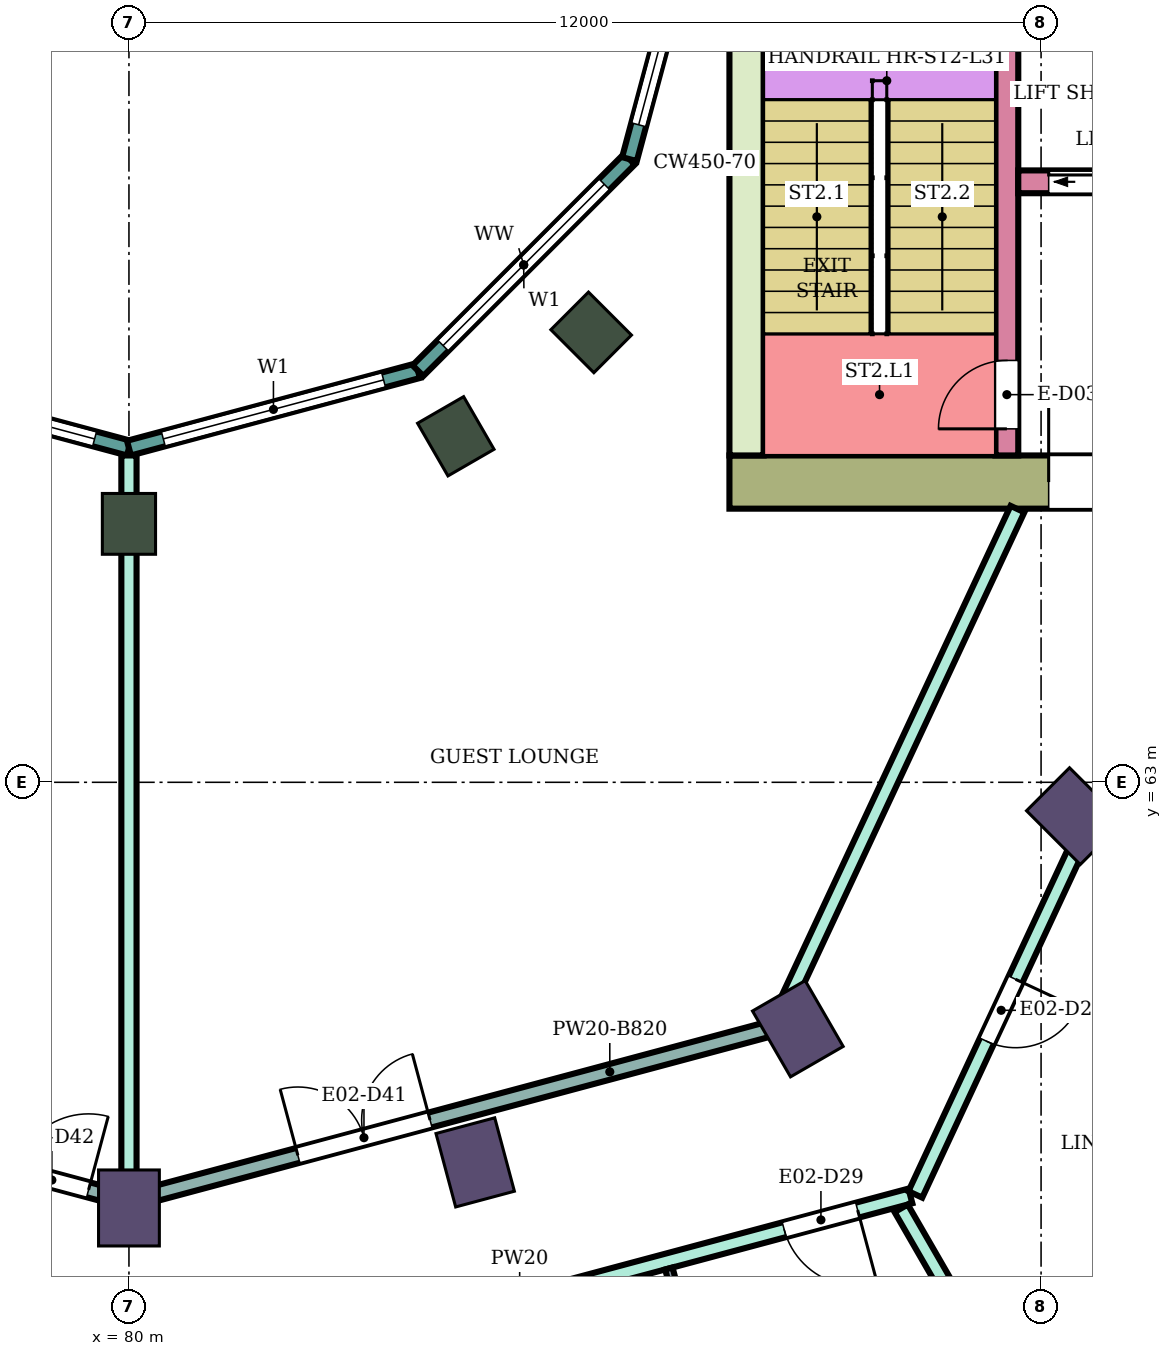
"""IFC4 building model, lengths in metres.
Left out: names, types, materials, properties, quantities, classifications, styles, units other than length and angle.
Written with IfcOpenShell. Run it as: python <this file> out.ifc"""

import sys

from ifc_helpers import new_model, si_unit, direction, frame, frame_2d, origin, origin_2d, place, context, subcontext, project, spatial, rectangle, extrude, element, fill, save


model = new_model("IFC4")
c1 = context("Model", 3, precision=1e-05, world=origin(), true_north=direction((0.0, 1.0)))
c2 = subcontext(c1, "Body", "Model", "MODEL_VIEW")
j1 = project(units=[si_unit("LENGTHUNIT", "METRE"), si_unit("PLANEANGLEUNIT", "RADIAN")], contexts=[c1])
p1 = place(None, origin())
s1 = spatial("IfcSite", under=j1, at=p1, CompositionType="ELEMENT")
p2 = place(p1, origin())
s2 = spatial("IfcBuilding", under=s1, at=p2, CompositionType="ELEMENT")
p3 = place(p2, frame((0.0, 0.0, 134.1)))
s3 = spatial("IfcBuildingStorey", under=s2, at=p3, CompositionType="ELEMENT", Elevation=134.1)
for number, where, z_axis, x_axis in (
    (1, (80.0, 57.4, 0.0), (0.0, 0.0, 1.0), (0.0, -1.0, 0.0)),
    (2, (84.555, 58.0, 0.0), (0.0, 0.0, 1.0), (0.259, -0.966, 0.0)),
    (3, (88.8, 59.758, 0.0), (0.0, 0.0, 1.0), (0.5, -0.866, 0.0)),
    (4, (92.445, 62.555, 0.0), (0.0, 0.0, 1.0), (0.707, -0.707, 0.0)),
):
    element("IfcColumn", number, at=place(p3, frame(where, z_axis=z_axis, x_axis=x_axis)), inside=s3, PredefinedType="COLUMN", context=c2, shape_type="SweptSolid", body=[
        extrude(rectangle(XDim=1.0, YDim=0.8, at=origin_2d()), origin(), (0.0, 0.0, 1.0), 3.9),
    ])
for number, where, z_axis, x_axis in (
    (5, (80.0, 66.4, 0.0), (0.0, 0.0, 1.0), (0.0, -1.0, 0.0)),
    (6, (84.3, 67.552, 0.0), (0.0, 0.0, 1.0), (0.5, -0.866, 0.0)),
    (7, (86.081, 68.919, 0.0), (0.0, 0.0, 1.0), (0.707, -0.707, 0.0)),
):
    element("IfcColumn", number, at=place(p3, frame(where, z_axis=z_axis, x_axis=x_axis)), inside=s3, PredefinedType="COLUMN", context=c2, shape_type="SweptSolid", body=[
        extrude(rectangle(XDim=0.8, YDim=0.7, at=origin_2d()), origin(), (0.0, 0.0, 1.0), 3.9),
    ])
p4 = place(p3, frame((87.9, 66.95, 0.0), z_axis=(0.0, 0.0, 1.0), x_axis=(1.0, 0.0, 0.0)))
e8 = element("IfcWall", 8, at=p4, inside=s3, PredefinedType="SHEAR", context=c2, shape_type="SweptSolid", body=[
    extrude(rectangle(XDim=14.8, YDim=0.7, at=frame_2d((7.4, 0.0))), origin(), (0.0, 0.0, 1.0), 3.58),
])
p5 = place(p4, frame((4.2, 0.0, 0.0)))
e9 = element("IfcOpeningElement", 9, at=p5, cuts=e8, PredefinedType="OPENING", context=c2, shape_type="SweptSolid", body=[
    extrude(rectangle(XDim=2.4, YDim=2.4, at=frame_2d((1.2, 1.2))), frame((0.0, 0.36, 0.0), z_axis=(0.0, -1.0, 0.0), x_axis=(1.0, 0.0, 0.0)), (0.0, 0.0, 1.0), 0.72),
])
p6 = place(p3, frame((88.125, 67.3, 0.0), z_axis=(0.0, 0.0, 1.0), x_axis=(0.0, 1.0, 0.0)))
e10 = element("IfcWall", 10, at=p6, inside=s3, PredefinedType="SHEAR", context=c2, shape_type="SweptSolid", body=[
    extrude(rectangle(XDim=7.7, YDim=0.45, at=frame_2d((3.85, 0.0))), origin(), (0.0, 0.0, 1.0), 3.58),
])
p7 = place(p3, frame((91.55, 67.3, 0.0), z_axis=(0.0, 0.0, 1.0), x_axis=(0.0, 1.0, 0.0)))
e11 = element("IfcWall", 11, at=p7, inside=s3, PredefinedType="SHEAR", context=c2, shape_type="SweptSolid", body=[
    extrude(rectangle(XDim=7.7, YDim=0.3, at=frame_2d((3.85, 0.0))), origin(), (0.0, 0.0, 1.0), 3.58),
])
p8 = place(p7, frame((0.35, 0.0, 0.0)))
e12 = element("IfcOpeningElement", 12, at=p8, cuts=e11, PredefinedType="OPENING", context=c2, shape_type="SweptSolid", body=[
    extrude(rectangle(XDim=0.9, YDim=2.1, at=frame_2d((0.45, 1.05))), frame((0.0, 0.16, 0.0), z_axis=(0.0, -1.0, 0.0), x_axis=(1.0, 0.0, 0.0)), (0.0, 0.0, 1.0), 0.32),
])
p9 = place(p3, frame((91.7, 70.9, 0.0), z_axis=(0.0, 0.0, 1.0), x_axis=(1.0, 0.0, 0.0)))
e13 = element("IfcWall", 13, at=p9, inside=s3, PredefinedType="SHEAR", context=c2, shape_type="SweptSolid", body=[
    extrude(rectangle(XDim=11.0, YDim=0.3, at=frame_2d((5.5, 0.0))), origin(), (0.0, 0.0, 1.0), 3.58),
])
p10 = place(p9, frame((0.4, 0.0, 0.0)))
e14 = element("IfcOpeningElement", 14, at=p10, cuts=e13, PredefinedType="OPENING", context=c2, shape_type="SweptSolid", body=[
    extrude(rectangle(XDim=1.4, YDim=2.1, at=frame_2d((0.7, 1.05))), frame((0.0, 0.16, 0.0), z_axis=(0.0, -1.0, 0.0), x_axis=(1.0, 0.0, 0.0)), (0.0, 0.0, 1.0), 0.32),
])
p11 = place(p9, frame((5.4, 0.0, 0.0)))
e15 = element("IfcOpeningElement", 15, at=p11, cuts=e13, PredefinedType="OPENING", context=c2, shape_type="SweptSolid", body=[
    extrude(rectangle(XDim=1.4, YDim=2.1, at=frame_2d((0.7, 1.05))), frame((0.0, 0.16, 0.0), z_axis=(0.0, -1.0, 0.0), x_axis=(1.0, 0.0, 0.0)), (0.0, 0.0, 1.0), 0.32),
])
p12 = place(p9, frame((8.1, 0.0, 0.0)))
e16 = element("IfcOpeningElement", 16, at=p12, cuts=e13, PredefinedType="OPENING", context=c2, shape_type="SweptSolid", body=[
    extrude(rectangle(XDim=1.0, YDim=2.1, at=frame_2d((0.5, 1.05))), frame((0.0, 0.16, 0.0), z_axis=(0.0, -1.0, 0.0), x_axis=(1.0, 0.0, 0.0)), (0.0, 0.0, 1.0), 0.32),
])
p13 = place(p3, frame((76.198, 68.415, 0.0), z_axis=(0.0, 0.0, 1.0), x_axis=(0.965933654434, -0.258789828301, 0.0)))
e17 = element("IfcWall", 17, at=p13, inside=s3, PredefinedType="NOTDEFINED", context=c2, shape_type="SweptSolid", body=[
    extrude(rectangle(XDim=3.936, YDim=0.2, at=frame_2d((1.968, 0.0))), origin(), (0.0, 0.0, 1.0), 3.9),
])
p14 = place(p13, frame((0.468, 0.0, 0.9)))
e18 = element("IfcOpeningElement", 18, at=p14, cuts=e17, PredefinedType="OPENING", context=c2, shape_type="SweptSolid", body=[
    extrude(rectangle(XDim=3.0, YDim=2.3, at=frame_2d((1.5, 1.15))), frame((0.0, 0.11, 0.0), z_axis=(0.0, -1.0, 0.0), x_axis=(1.0, 0.0, 0.0)), (0.0, 0.0, 1.0), 0.22),
])
p15 = place(p3, frame((80.0, 67.396, 0.0), z_axis=(0.0, 0.0, 1.0), x_axis=(0.965933654434, 0.258789828301, 0.0)))
e19 = element("IfcWall", 19, at=p15, inside=s3, PredefinedType="NOTDEFINED", context=c2, shape_type="SweptSolid", body=[
    extrude(rectangle(XDim=3.936, YDim=0.2, at=frame_2d((1.968, 0.0))), origin(), (0.0, 0.0, 1.0), 3.9),
])
p16 = place(p15, frame((0.468, 0.0, 0.9)))
e20 = element("IfcOpeningElement", 20, at=p16, cuts=e19, PredefinedType="OPENING", context=c2, shape_type="SweptSolid", body=[
    extrude(rectangle(XDim=3.0, YDim=2.3, at=frame_2d((1.5, 1.15))), frame((0.0, 0.11, 0.0), z_axis=(0.0, -1.0, 0.0), x_axis=(1.0, 0.0, 0.0)), (0.0, 0.0, 1.0), 0.22),
])
p17 = place(p3, frame((83.802, 68.415, 0.0), z_axis=(0.0, 0.0, 1.0), x_axis=(0.707106781187, 0.707106781187, 0.0)))
e21 = element("IfcWall", 21, at=p17, inside=s3, PredefinedType="NOTDEFINED", context=c2, shape_type="SweptSolid", body=[
    extrude(rectangle(XDim=3.936, YDim=0.2, at=frame_2d((1.968, 0.0))), origin(), (0.0, 0.0, 1.0), 3.9),
])
p18 = place(p17, frame((0.468, 0.0, 0.9)))
e22 = element("IfcOpeningElement", 22, at=p18, cuts=e21, PredefinedType="OPENING", context=c2, shape_type="SweptSolid", body=[
    extrude(rectangle(XDim=3.0, YDim=2.3, at=frame_2d((1.5, 1.15))), frame((0.0, 0.11, 0.0), z_axis=(0.0, -1.0, 0.0), x_axis=(1.0, 0.0, 0.0)), (0.0, 0.0, 1.0), 0.22),
])
p19 = place(p3, frame((86.585, 71.198, 0.0), z_axis=(0.0, 0.0, 1.0), x_axis=(0.258789828301, 0.965933654434, 0.0)))
e23 = element("IfcWall", 23, at=p19, inside=s3, PredefinedType="NOTDEFINED", context=c2, shape_type="SweptSolid", body=[
    extrude(rectangle(XDim=3.936, YDim=0.2, at=frame_2d((1.968, 0.0))), origin(), (0.0, 0.0, 1.0), 3.9),
])
p20 = place(p19, frame((0.468, 0.0, 0.9)))
e24 = element("IfcOpeningElement", 24, at=p20, cuts=e23, PredefinedType="OPENING", context=c2, shape_type="SweptSolid", body=[
    extrude(rectangle(XDim=3.0, YDim=2.3, at=frame_2d((1.5, 1.15))), frame((0.0, 0.11, 0.0), z_axis=(0.0, -1.0, 0.0), x_axis=(1.0, 0.0, 0.0)), (0.0, 0.0, 1.0), 0.22),
])
p21 = place(p3, frame((69.652, 57.578, 0.0), z_axis=(0.0, 0.0, 1.0), x_axis=(0.965851674805, -0.259095623807, 0.0)))
e25 = element("IfcWall", 25, at=p21, inside=s3, PredefinedType="PARTITIONING", context=c2, shape_type="SweptSolid", body=[
    extrude(rectangle(XDim=10.623, YDim=0.2, at=frame_2d((5.312, 0.0))), origin(), (0.0, 0.0, 1.0), 3.45),
])
p22 = place(p21, frame((9.163, 0.0, 0.0)))
e26 = element("IfcOpeningElement", 26, at=p22, cuts=e25, PredefinedType="OPENING", context=c2, shape_type="SweptSolid", body=[
    extrude(rectangle(XDim=1.0, YDim=2.1, at=frame_2d((0.5, 1.05))), frame((0.0, 0.11, 0.0), z_axis=(0.0, -1.0, 0.0), x_axis=(1.0, 0.0, 0.0)), (0.0, 0.0, 1.0), 0.22),
])
p23 = place(p3, frame((71.498, 59.774, 0.0), z_axis=(0.0, 0.0, 1.0), x_axis=(0.965912232838, -0.258869771225, 0.0)))
e27 = element("IfcWall", 27, at=p23, inside=s3, PredefinedType="PARTITIONING", context=c2, shape_type="SweptSolid", body=[
    extrude(rectangle(XDim=8.672, YDim=0.2, at=frame_2d((4.336, 0.0))), origin(), (0.0, 0.0, 1.0), 3.08),
])
p24 = place(p23, frame((7.252, 0.0, 0.0)))
e28 = element("IfcOpeningElement", 28, at=p24, cuts=e27, PredefinedType="OPENING", context=c2, shape_type="SweptSolid", body=[
    extrude(rectangle(XDim=1.0, YDim=2.1, at=frame_2d((0.5, 1.05))), frame((0.0, 0.11, 0.0), z_axis=(0.0, -1.0, 0.0), x_axis=(1.0, 0.0, 0.0)), (0.0, 0.0, 1.0), 0.22),
])
p25 = place(p3, frame((80.0, 54.805, 0.0), z_axis=(0.0, 0.0, 1.0), x_axis=(0.965967909695, 0.258661936588, 0.0)))
e29 = element("IfcWall", 29, at=p25, inside=s3, PredefinedType="PARTITIONING", context=c2, shape_type="SweptSolid", body=[
    extrude(rectangle(XDim=10.643, YDim=0.2, at=frame_2d((5.322, 0.0))), origin(), (0.0, 0.0, 1.0), 3.45),
])
p26 = place(p25, frame((8.925, 0.0, 0.0)))
e30 = element("IfcOpeningElement", 30, at=p26, cuts=e29, PredefinedType="OPENING", context=c2, shape_type="SweptSolid", body=[
    extrude(rectangle(XDim=1.0, YDim=2.1, at=frame_2d((0.5, 1.05))), frame((0.0, 0.11, 0.0), z_axis=(0.0, -1.0, 0.0), x_axis=(1.0, 0.0, 0.0)), (0.0, 0.0, 1.0), 0.22),
])
p27 = place(p25, frame((2.123, 0.0, 0.0)))
e31 = element("IfcOpeningElement", 31, at=p27, cuts=e29, PredefinedType="OPENING", context=c2, shape_type="SweptSolid", body=[
    extrude(rectangle(XDim=1.0, YDim=2.1, at=frame_2d((0.5, 1.05))), frame((0.0, 0.11, 0.0), z_axis=(0.0, -1.0, 0.0), x_axis=(1.0, 0.0, 0.0)), (0.0, 0.0, 1.0), 0.22),
])
p28 = place(p3, frame((80.0, 57.627, 0.0), z_axis=(0.0, 0.0, 1.0), x_axis=(0.0, 1.0, 0.0)))
e32 = element("IfcWall", 32, at=p28, inside=s3, PredefinedType="PARTITIONING", context=c2, shape_type="SweptSolid", body=[
    extrude(rectangle(XDim=9.673, YDim=0.2, at=frame_2d((4.836, 0.0))), origin(), (0.0, 0.0, 1.0), 3.45),
])
p29 = place(p3, frame((80.001, 57.496, 0.0), z_axis=(0.0, 0.0, 1.0), x_axis=(0.965924211089, 0.258825073035, 0.0)))
e33 = element("IfcWall", 33, at=p29, inside=s3, PredefinedType="PARTITIONING", context=c2, shape_type="SweptSolid", body=[
    extrude(rectangle(XDim=8.731, YDim=0.2, at=frame_2d((4.365, 0.0))), origin(), (0.0, 0.0, 1.0), 3.08),
])
p30 = place(p29, frame((2.3, 0.0, 0.0)))
e34 = element("IfcOpeningElement", 34, at=p30, cuts=e33, PredefinedType="OPENING", context=c2, shape_type="SweptSolid", body=[
    extrude(rectangle(XDim=1.8, YDim=2.1, at=frame_2d((0.9, 1.05))), frame((0.0, 0.11, 0.0), z_axis=(0.0, -1.0, 0.0), x_axis=(1.0, 0.0, 0.0)), (0.0, 0.0, 1.0), 0.22),
])
p31 = place(p3, frame((88.502, 59.774, 0.0), z_axis=(0.0, 0.0, 1.0), x_axis=(0.423423307095, 0.905931952747, 0.0)))
e35 = element("IfcWall", 35, at=p31, inside=s3, PredefinedType="PARTITIONING", context=c2, shape_type="SweptSolid", body=[
    extrude(rectangle(XDim=7.529, YDim=0.2, at=frame_2d((3.764, 0.0))), origin(), (0.0, 0.0, 1.0), 3.45),
])
p32 = place(p3, frame((90.16, 57.396, 0.0), z_axis=(0.0, 0.0, 1.0), x_axis=(0.499848624781, -0.86611278267, 0.0)))
e36 = element("IfcWall", 36, at=p32, inside=s3, PredefinedType="PARTITIONING", context=c2, shape_type="SweptSolid", body=[
    extrude(rectangle(XDim=5.472, YDim=0.2, at=frame_2d((2.736, 0.0))), origin(), (0.0, 0.0, 1.0), 3.45),
])
p33 = place(p3, frame((90.346, 57.578, 0.0), z_axis=(0.0, 0.0, 1.0), x_axis=(0.422476720533, 0.906373775331, 0.0)))
e37 = element("IfcWall", 37, at=p33, inside=s3, PredefinedType="PARTITIONING", context=c2, shape_type="SweptSolid", body=[
    extrude(rectangle(XDim=8.208, YDim=0.2, at=frame_2d((4.104, 0.0))), origin(), (0.0, 0.0, 1.0), 3.45),
])
p34 = place(p33, frame((2.223, 0.0, 0.0)))
e38 = element("IfcOpeningElement", 38, at=p34, cuts=e37, PredefinedType="OPENING", context=c2, shape_type="SweptSolid", body=[
    extrude(rectangle(XDim=0.9, YDim=2.1, at=frame_2d((0.45, 1.05))), frame((0.0, 0.11, 0.0), z_axis=(0.0, -1.0, 0.0), x_axis=(1.0, 0.0, 0.0)), (0.0, 0.0, 1.0), 0.22),
])
p35 = place(p3, frame((92.692, 62.303, 0.0), z_axis=(0.0, 0.0, 1.0), x_axis=(0.706943936447, -0.707269588432, 0.0)))
e39 = element("IfcWall", 39, at=p35, inside=s3, PredefinedType="PARTITIONING", context=c2, shape_type="SweptSolid", body=[
    extrude(rectangle(XDim=5.248, YDim=0.2, at=frame_2d((2.624, 0.0))), origin(), (0.0, 0.0, 1.0), 3.45),
])
p36 = place(p3, frame((87.103, 56.604, 0.0), z_axis=(0.0, 0.0, 1.0), x_axis=(0.258883730688, -0.965908491517, 0.0)))
e40 = element("IfcWall", 40, at=p36, inside=s3, PredefinedType="PARTITIONING", context=c2, shape_type="SweptSolid", body=[
    extrude(rectangle(XDim=2.7, YDim=0.1, at=frame_2d((1.35, 0.0))), origin(), (0.0, 0.0, 1.0), 3.45),
])
p37 = place(p36, frame((0.9, 0.0, 0.0)))
e41 = element("IfcOpeningElement", 41, at=p37, cuts=e40, PredefinedType="OPENING", context=c2, shape_type="SweptSolid", body=[
    extrude(rectangle(XDim=0.8, YDim=2.1, at=frame_2d((0.4, 1.05))), frame((0.0, 0.06, 0.0), z_axis=(0.0, -1.0, 0.0), x_axis=(1.0, 0.0, 0.0)), (0.0, 0.0, 1.0), 0.12),
])
p38 = place(p3, frame((92.477, 53.619, 0.0), z_axis=(0.0, 0.0, 1.0), x_axis=(0.421913254756, 0.90663620348, 0.0)))
e42 = element("IfcWall", 42, at=p38, inside=s3, PredefinedType="PARTITIONING", context=c2, shape_type="SweptSolid", body=[
    extrude(rectangle(XDim=6.573, YDim=0.1, at=frame_2d((3.287, 0.0))), origin(), (0.0, 0.0, 1.0), 2.68),
])
p39 = place(p38, frame((2.831, 0.0, 0.0)))
e43 = element("IfcOpeningElement", 43, at=p39, cuts=e42, PredefinedType="OPENING", context=c2, shape_type="SweptSolid", body=[
    extrude(rectangle(XDim=0.9, YDim=2.1, at=frame_2d((0.45, 1.05))), frame((0.0, 0.06, 0.0), z_axis=(0.0, -1.0, 0.0), x_axis=(1.0, 0.0, 0.0)), (0.0, 0.0, 1.0), 0.12),
])
p40 = place(p14, origin())
e44 = element("IfcWindow", 44, at=p40, inside=s3, PartitioningType="SINGLE_PANEL", PredefinedType="WINDOW", context=c2, shape_type="SweptSolid", body=[
    extrude(rectangle(XDim=3.0, YDim=2.3, at=frame_2d((1.5, 1.15))), frame((0.0, 0.03, 0.0), z_axis=(0.0, -1.0, 0.0), x_axis=(1.0, 0.0, 0.0)), (0.0, 0.0, 1.0), 0.06),
])
fill(e18, e44)
p41 = place(p16, origin())
e45 = element("IfcWindow", 45, at=p41, inside=s3, PartitioningType="SINGLE_PANEL", PredefinedType="WINDOW", context=c2, shape_type="SweptSolid", body=[
    extrude(rectangle(XDim=3.0, YDim=2.3, at=frame_2d((1.5, 1.15))), frame((0.0, 0.03, 0.0), z_axis=(0.0, -1.0, 0.0), x_axis=(1.0, 0.0, 0.0)), (0.0, 0.0, 1.0), 0.06),
])
fill(e20, e45)
p42 = place(p18, origin())
e46 = element("IfcWindow", 46, at=p42, inside=s3, PartitioningType="SINGLE_PANEL", PredefinedType="WINDOW", context=c2, shape_type="SweptSolid", body=[
    extrude(rectangle(XDim=3.0, YDim=2.3, at=frame_2d((1.5, 1.15))), frame((0.0, 0.03, 0.0), z_axis=(0.0, -1.0, 0.0), x_axis=(1.0, 0.0, 0.0)), (0.0, 0.0, 1.0), 0.06),
])
fill(e22, e46)
p43 = place(p20, origin())
e47 = element("IfcWindow", 47, at=p43, inside=s3, PartitioningType="SINGLE_PANEL", PredefinedType="WINDOW", context=c2, shape_type="SweptSolid", body=[
    extrude(rectangle(XDim=3.0, YDim=2.3, at=frame_2d((1.5, 1.15))), frame((0.0, 0.03, 0.0), z_axis=(0.0, -1.0, 0.0), x_axis=(1.0, 0.0, 0.0)), (0.0, 0.0, 1.0), 0.06),
])
fill(e24, e47)
p44 = place(p34, frame((0.9, 0.0, 0.0), z_axis=(0.0, 0.0, 1.0), x_axis=(-1.0, 0.0, 0.0)))
e48 = element("IfcDoor", 48, at=p44, inside=s3, OperationType="SINGLE_SWING_LEFT", PredefinedType="DOOR", context=c2, shape_type="SweptSolid", body=[
    extrude(rectangle(XDim=0.9, YDim=2.1, at=frame_2d((0.45, 1.05))), frame((0.0, 0.025, 0.0), z_axis=(0.0, -1.0, 0.0), x_axis=(1.0, 0.0, 0.0)), (0.0, 0.0, 1.0), 0.05),
])
fill(e38, e48)
p45 = place(p26, frame((1.0, 0.0, 0.0), z_axis=(0.0, 0.0, 1.0), x_axis=(-1.0, 0.0, 0.0)))
e49 = element("IfcDoor", 49, at=p45, inside=s3, OperationType="SINGLE_SWING_LEFT", PredefinedType="DOOR", context=c2, shape_type="SweptSolid", body=[
    extrude(rectangle(XDim=1.0, YDim=2.1, at=frame_2d((0.5, 1.05))), frame((0.0, 0.025, 0.0), z_axis=(0.0, -1.0, 0.0), x_axis=(1.0, 0.0, 0.0)), (0.0, 0.0, 1.0), 0.05),
])
fill(e30, e49)
p46 = place(p30, origin())
e50 = element("IfcDoor", 50, at=p46, inside=s3, OperationType="DOUBLE_DOOR_SINGLE_SWING", PredefinedType="DOOR", context=c2, shape_type="SweptSolid", body=[
    extrude(rectangle(XDim=1.8, YDim=2.1, at=frame_2d((0.9, 1.05))), frame((0.0, 0.025, 0.0), z_axis=(0.0, -1.0, 0.0), x_axis=(1.0, 0.0, 0.0)), (0.0, 0.0, 1.0), 0.05),
])
fill(e34, e50)
p47 = place(p24, origin())
e51 = element("IfcDoor", 51, at=p47, inside=s3, OperationType="SINGLE_SWING_RIGHT", PredefinedType="DOOR", context=c2, shape_type="SweptSolid", body=[
    extrude(rectangle(XDim=1.0, YDim=2.1, at=frame_2d((0.5, 1.05))), frame((0.0, 0.025, 0.0), z_axis=(0.0, -1.0, 0.0), x_axis=(1.0, 0.0, 0.0)), (0.0, 0.0, 1.0), 0.05),
])
fill(e28, e51)
p48 = place(p8, origin())
e52 = element("IfcDoor", 52, at=p48, inside=s3, OperationType="SINGLE_SWING_LEFT", PredefinedType="DOOR", context=c2, shape_type="SweptSolid", body=[
    extrude(rectangle(XDim=0.9, YDim=2.1, at=frame_2d((0.45, 1.05))), frame((0.0, 0.025, 0.0), z_axis=(0.0, -1.0, 0.0), x_axis=(1.0, 0.0, 0.0)), (0.0, 0.0, 1.0), 0.05),
])
fill(e12, e52)
p49 = place(p10, origin())
e53 = element("IfcDoor", 53, at=p49, inside=s3, OperationType="DOUBLE_DOOR_SLIDING", PredefinedType="DOOR", context=c2, shape_type="SweptSolid", body=[
    extrude(rectangle(XDim=1.4, YDim=2.1, at=frame_2d((0.7, 1.05))), frame((0.0, 0.025, 0.0), z_axis=(0.0, -1.0, 0.0), x_axis=(1.0, 0.0, 0.0)), (0.0, 0.0, 1.0), 0.05),
])
fill(e14, e53)
p50 = place(p5, origin())
e54 = element("IfcDoor", 54, at=p50, inside=s3, OperationType="DOUBLE_DOOR_SINGLE_SWING", PredefinedType="DOOR", context=c2, shape_type="SweptSolid", body=[
    extrude(rectangle(XDim=2.4, YDim=2.4, at=frame_2d((1.2, 1.2))), frame((0.0, 0.025, 0.0), z_axis=(0.0, -1.0, 0.0), x_axis=(1.0, 0.0, 0.0)), (0.0, 0.0, 1.0), 0.05),
])
fill(e9, e54)
save(model, sys.argv[1])
